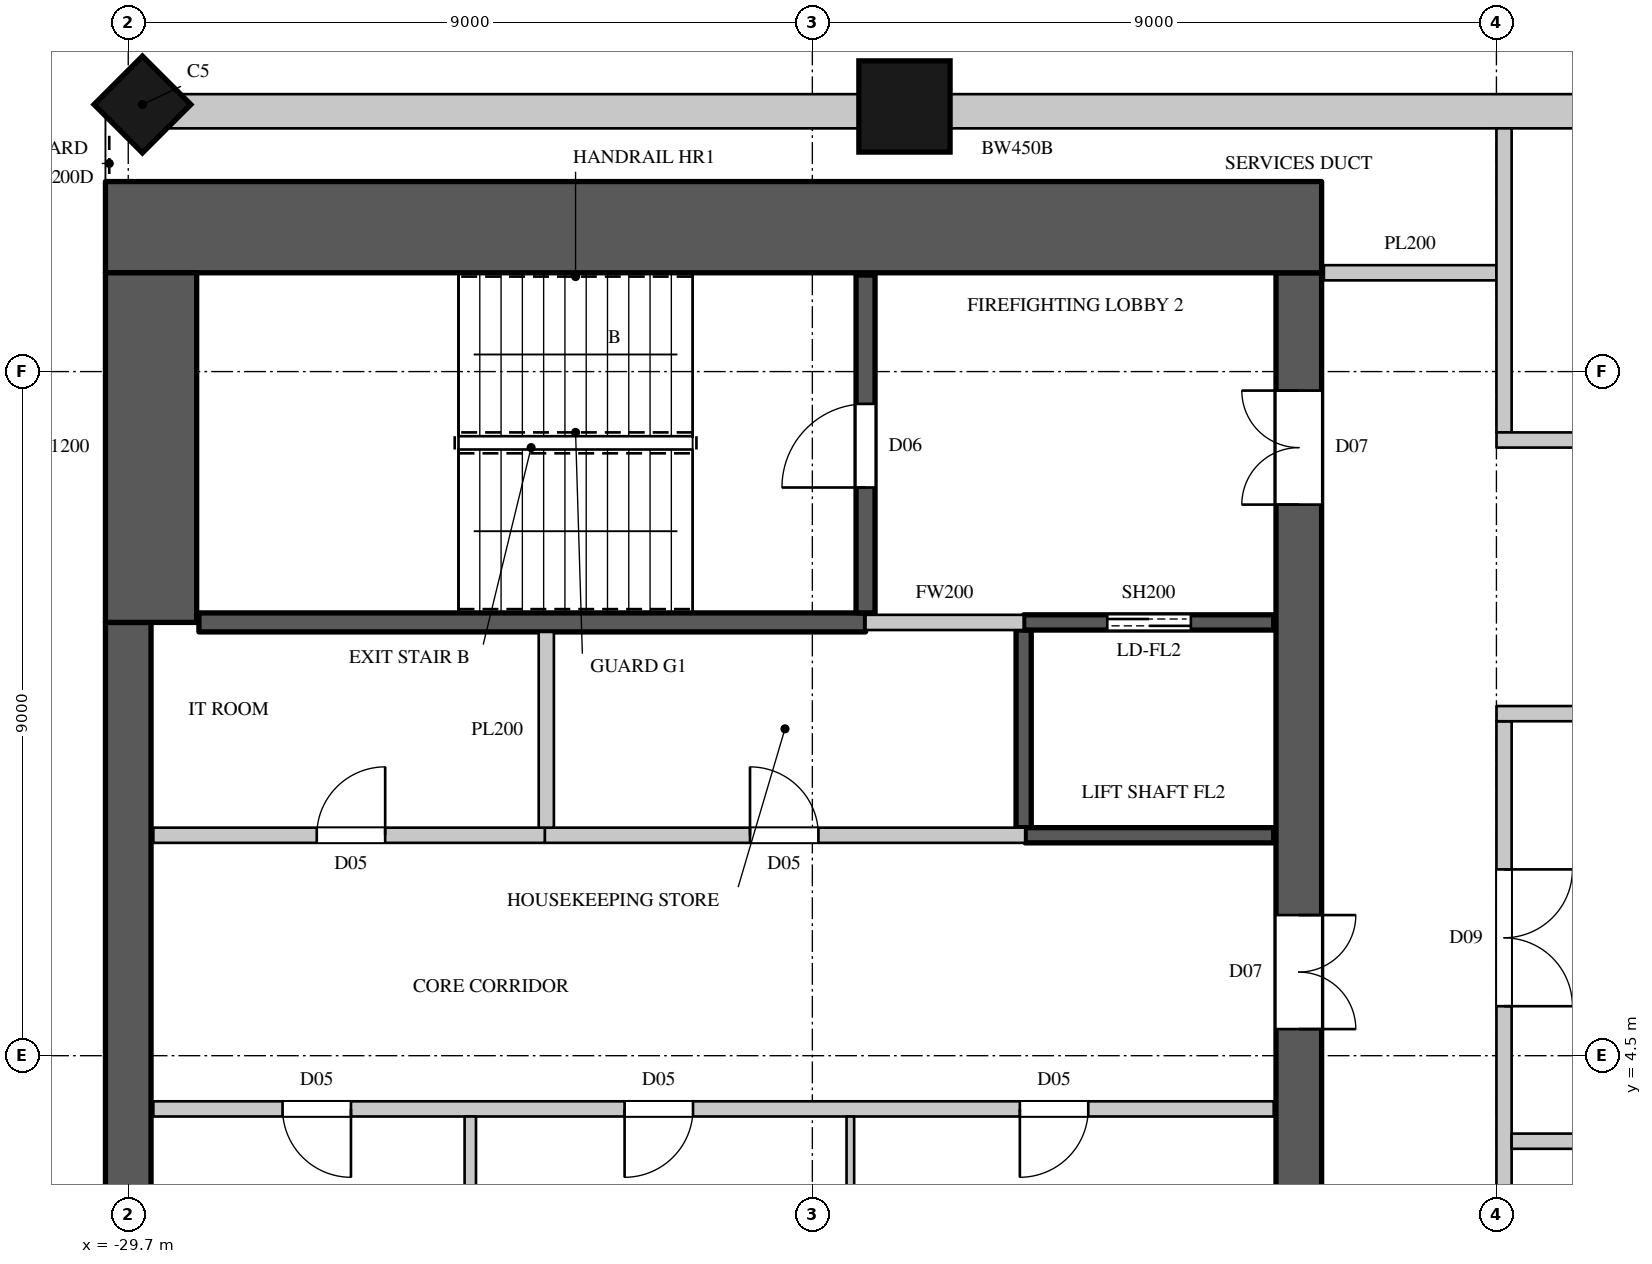
"""IFC4 building model, lengths in metres.
Left out: names, types, materials, properties, quantities, classifications, styles, units other than length and angle.
Written with IfcOpenShell. Run it as: python <this file> out.ifc"""

import sys

from ifc_helpers import new_model, si_unit, direction, frame, frame_2d, origin, origin_2d, place, context, subcontext, project, spatial, rectangle, circle, extrude, element, fill, save


model = new_model("IFC4")
c1 = context("Model", 3, precision=1e-05, world=origin(), true_north=direction((0.0, 1.0)))
c2 = subcontext(c1, "Body", "Model", "MODEL_VIEW")
j1 = project(units=[si_unit("LENGTHUNIT", "METRE"), si_unit("PLANEANGLEUNIT", "RADIAN")], contexts=[c1])
p1 = place(None, origin())
s1 = spatial("IfcSite", under=j1, at=p1, CompositionType="ELEMENT")
p2 = place(p1, origin())
s2 = spatial("IfcBuilding", under=s1, at=p2, CompositionType="ELEMENT")
p3 = place(p2, frame((0.0, 0.0, 335.0)))
s3 = spatial("IfcBuildingStorey", under=s2, at=p3, CompositionType="ELEMENT", Elevation=335.0)
p4 = place(p3, frame((-19.488, 16.988, 0.0), z_axis=(0.0, 0.0, 1.0), x_axis=(1.0, 0.0, 0.0)))
e1 = element("IfcColumn", 1, at=p4, inside=s3, PredefinedType="COLUMN", context=c2, shape_type="SweptSolid", body=[
    extrude(circle(Radius=0.6, at=origin_2d()), origin(), (0.0, 0.0, 1.0), 4.0),
])
p5 = place(p3, frame((-29.514, 17.014, 0.0), z_axis=(0.0, 0.0, 1.0), x_axis=(-0.707106781187, -0.707106781187, 0.0)))
e2 = element("IfcColumn", 2, at=p5, inside=s3, PredefinedType="COLUMN", context=c2, shape_type="SweptSolid", body=[
    extrude(rectangle(XDim=0.9, YDim=0.9, at=origin_2d()), origin(), (0.0, 0.0, 1.0), 4.0),
])
p6 = place(p3, frame((-6.75, 16.925, 0.0), z_axis=(0.0, 0.0, 1.0), x_axis=(-1.0, 0.0, 0.0)))
e3 = element("IfcWall", 3, at=p6, inside=s3, PredefinedType="SOLIDWALL", context=c2, shape_type="SweptSolid", body=[
    extrude(rectangle(XDim=22.5, YDim=0.45, at=frame_2d((11.25, 0.0))), origin(), (0.0, 0.0, 1.0), 3.7),
])
p7 = place(p3, frame((-30.0, 15.4, 0.0), z_axis=(0.0, 0.0, 1.0), x_axis=(1.0, 0.0, 0.0)))
e4 = element("IfcWall", 4, at=p7, inside=s3, PredefinedType="SHEAR", context=c2, shape_type="SweptSolid", body=[
    extrude(rectangle(XDim=16.0, YDim=1.2, at=frame_2d((8.0, 0.0))), origin(), (0.0, 0.0, 1.0), 4.0),
])
p8 = place(p3, frame((-14.3, -14.8, 0.0), z_axis=(0.0, 0.0, 1.0), x_axis=(0.0, 1.0, 0.0)))
e5 = element("IfcWall", 5, at=p8, inside=s3, PredefinedType="SHEAR", context=c2, shape_type="SweptSolid", body=[
    extrude(rectangle(XDim=29.6, YDim=0.6, at=frame_2d((14.8, 0.0))), origin(), (0.0, 0.0, 1.0), 4.0),
])
p9 = place(p8, frame((1.55, 0.0, 0.0)))
e6 = element("IfcOpeningElement", 6, at=p9, cuts=e5, PredefinedType="OPENING", context=c2, shape_type="SweptSolid", body=[
    extrude(rectangle(XDim=1.5, YDim=2.4, at=frame_2d((0.75, 1.2))), frame((0.0, 0.31, 0.0), z_axis=(0.0, -1.0, 0.0), x_axis=(1.0, 0.0, 0.0)), (0.0, 0.0, 1.0), 0.62),
])
p10 = place(p8, frame((26.55, 0.0, 0.0)))
e7 = element("IfcOpeningElement", 7, at=p10, cuts=e5, PredefinedType="OPENING", context=c2, shape_type="SweptSolid", body=[
    extrude(rectangle(XDim=1.5, YDim=2.4, at=frame_2d((0.75, 1.2))), frame((0.0, 0.31, 0.0), z_axis=(0.0, -1.0, 0.0), x_axis=(1.0, 0.0, 0.0)), (0.0, 0.0, 1.0), 0.62),
])
p11 = place(p8, frame((8.45, 0.0, 0.0)))
e8 = element("IfcOpeningElement", 8, at=p11, cuts=e5, PredefinedType="OPENING", context=c2, shape_type="SweptSolid", body=[
    extrude(rectangle(XDim=1.5, YDim=2.4, at=frame_2d((0.75, 1.2))), frame((0.0, 0.31, 0.0), z_axis=(0.0, -1.0, 0.0), x_axis=(1.0, 0.0, 0.0)), (0.0, 0.0, 1.0), 0.62),
])
p12 = place(p8, frame((19.65, 0.0, 0.0)))
e9 = element("IfcOpeningElement", 9, at=p12, cuts=e5, PredefinedType="OPENING", context=c2, shape_type="SweptSolid", body=[
    extrude(rectangle(XDim=1.5, YDim=2.4, at=frame_2d((0.75, 1.2))), frame((0.0, 0.31, 0.0), z_axis=(0.0, -1.0, 0.0), x_axis=(1.0, 0.0, 0.0)), (0.0, 0.0, 1.0), 0.62),
])
p13 = place(p8, frame((14.5, 0.0, 0.0)))
e10 = element("IfcOpeningElement", 10, at=p13, cuts=e5, PredefinedType="OPENING", context=c2, shape_type="SweptSolid", body=[
    extrude(rectangle(XDim=0.6, YDim=2.0, at=frame_2d((0.3, 1.0))), frame((0.0, 0.31, 0.0), z_axis=(0.0, -1.0, 0.0), x_axis=(1.0, 0.0, 0.0)), (0.0, 0.0, 1.0), 0.62),
])
p14 = place(p3, frame((-29.7, -10.2, 0.0), z_axis=(0.0, 0.0, 1.0), x_axis=(0.0, 1.0, 0.0)))
e11 = element("IfcWall", 11, at=p14, inside=s3, PredefinedType="SHEAR", context=c2, shape_type="SweptSolid", body=[
    extrude(rectangle(XDim=20.4, YDim=0.6, at=frame_2d((10.2, 0.0))), origin(), (0.0, 0.0, 1.0), 4.0),
])
p15 = place(p3, frame((-29.4, 10.2, 0.0), z_axis=(0.0, 0.0, 1.0), x_axis=(0.0, 1.0, 0.0)))
e12 = element("IfcWall", 12, at=p15, inside=s3, PredefinedType="SHEAR", context=c2, shape_type="SweptSolid", body=[
    extrude(rectangle(XDim=4.6, YDim=1.2, at=frame_2d((2.3, 0.0))), origin(), (0.0, 0.0, 1.0), 4.0),
])
p16 = place(p3, frame((-29.37, 3.8, 0.0), z_axis=(0.0, 0.0, 1.0), x_axis=(1.0, 0.0, 0.0)))
e13 = element("IfcWall", 13, at=p16, inside=s3, PredefinedType="PARTITIONING", context=c2, shape_type="SweptSolid", body=[
    extrude(rectangle(XDim=14.74, YDim=0.2, at=frame_2d((7.37, 0.0))), origin(), (0.0, 0.0, 1.0), 3.598),
])
p17 = place(p16, frame((1.7, 0.0, 0.0)))
e14 = element("IfcOpeningElement", 14, at=p17, cuts=e13, PredefinedType="OPENING", context=c2, shape_type="SweptSolid", body=[
    extrude(rectangle(XDim=0.9, YDim=2.2, at=frame_2d((0.45, 1.1))), frame((0.0, 0.11, 0.0), z_axis=(0.0, -1.0, 0.0), x_axis=(1.0, 0.0, 0.0)), (0.0, 0.0, 1.0), 0.22),
])
p18 = place(p16, frame((6.2, 0.0, 0.0)))
e15 = element("IfcOpeningElement", 15, at=p18, cuts=e13, PredefinedType="OPENING", context=c2, shape_type="SweptSolid", body=[
    extrude(rectangle(XDim=0.9, YDim=2.2, at=frame_2d((0.45, 1.1))), frame((0.0, 0.11, 0.0), z_axis=(0.0, -1.0, 0.0), x_axis=(1.0, 0.0, 0.0)), (0.0, 0.0, 1.0), 0.22),
])
p19 = place(p16, frame((11.4, 0.0, 0.0)))
e16 = element("IfcOpeningElement", 16, at=p19, cuts=e13, PredefinedType="OPENING", context=c2, shape_type="SweptSolid", body=[
    extrude(rectangle(XDim=0.9, YDim=2.2, at=frame_2d((0.45, 1.1))), frame((0.0, 0.11, 0.0), z_axis=(0.0, -1.0, 0.0), x_axis=(1.0, 0.0, 0.0)), (0.0, 0.0, 1.0), 0.22),
])
p20 = place(p3, frame((-24.22, 7.4, 0.0), z_axis=(0.0, 0.0, 1.0), x_axis=(1.0, 0.0, 0.0)))
e17 = element("IfcWall", 17, at=p20, inside=s3, PredefinedType="PARTITIONING", context=c2, shape_type="SweptSolid", body=[
    extrude(rectangle(XDim=6.32, YDim=0.2, at=frame_2d((3.16, 0.0))), origin(), (0.0, 0.0, 1.0), 3.598),
])
p21 = place(p20, frame((2.7, 0.0, 0.0)))
e18 = element("IfcOpeningElement", 18, at=p21, cuts=e17, PredefinedType="OPENING", context=c2, shape_type="SweptSolid", body=[
    extrude(rectangle(XDim=0.9, YDim=2.2, at=frame_2d((0.45, 1.1))), frame((0.0, 0.11, 0.0), z_axis=(0.0, -1.0, 0.0), x_axis=(1.0, 0.0, 0.0)), (0.0, 0.0, 1.0), 0.22),
])
p22 = place(p3, frame((-20.0, 10.2, 0.0), z_axis=(0.0, 0.0, 1.0), x_axis=(1.0, 0.0, 0.0)))
e19 = element("IfcWall", 19, at=p22, inside=s3, PredefinedType="PARTITIONING", context=c2, shape_type="SweptSolid", body=[
    extrude(rectangle(XDim=2.08, YDim=0.2, at=frame_2d((1.04, 0.0))), origin(), (0.0, 0.0, 1.0), 3.598),
])
p23 = place(p3, frame((-25.2, 1.1, 0.0), z_axis=(0.0, 0.0, 1.0), x_axis=(0.0, 1.0, 0.0)))
e20 = element("IfcWall", 20, at=p23, inside=s3, PredefinedType="PARTITIONING", context=c2, shape_type="SweptSolid", body=[
    extrude(rectangle(XDim=2.6, YDim=0.15, at=frame_2d((1.3, 0.0))), origin(), (0.0, 0.0, 1.0), 3.598),
])
p24 = place(p3, frame((-29.37, 7.4, 0.0), z_axis=(0.0, 0.0, 1.0), x_axis=(1.0, 0.0, 0.0)))
e21 = element("IfcWall", 21, at=p24, inside=s3, PredefinedType="PARTITIONING", context=c2, shape_type="SweptSolid", body=[
    extrude(rectangle(XDim=5.15, YDim=0.2, at=frame_2d((2.575, 0.0))), origin(), (0.0, 0.0, 1.0), 3.598),
])
p25 = place(p24, frame((2.15, 0.0, 0.0)))
e22 = element("IfcOpeningElement", 22, at=p25, cuts=e21, PredefinedType="OPENING", context=c2, shape_type="SweptSolid", body=[
    extrude(rectangle(XDim=0.9, YDim=2.2, at=frame_2d((0.45, 1.1))), frame((0.0, 0.11, 0.0), z_axis=(0.0, -1.0, 0.0), x_axis=(1.0, 0.0, 0.0)), (0.0, 0.0, 1.0), 0.22),
])
p26 = place(p3, frame((-24.2, 7.5, 0.0), z_axis=(0.0, 0.0, 1.0), x_axis=(0.0, 1.0, 0.0)))
e23 = element("IfcWall", 23, at=p26, inside=s3, PredefinedType="PARTITIONING", context=c2, shape_type="SweptSolid", body=[
    extrude(rectangle(XDim=2.575, YDim=0.2, at=frame_2d((1.288, 0.0))), origin(), (0.0, 0.0, 1.0), 3.598),
])
p27 = place(p3, frame((-13.97, 14.8, 0.0), z_axis=(0.0, 0.0, 1.0), x_axis=(1.0, 0.0, 0.0)))
e24 = element("IfcWall", 24, at=p27, inside=s3, PredefinedType="PARTITIONING", context=c2, shape_type="SweptSolid", body=[
    extrude(rectangle(XDim=2.27, YDim=0.2, at=frame_2d((1.135, 0.0))), origin(), (0.0, 0.0, 1.0), 3.598),
])
p28 = place(p3, frame((-11.6, -8.899, 0.0), z_axis=(0.0, 0.0, 1.0), x_axis=(0.0, 1.0, 0.0)))
e25 = element("IfcWall", 25, at=p28, inside=s3, PredefinedType="PARTITIONING", context=c2, shape_type="SweptSolid", body=[
    extrude(rectangle(XDim=17.798, YDim=0.2, at=frame_2d((8.899, 0.0))), origin(), (0.0, 0.0, 1.0), 3.598),
])
p29 = place(p28, frame((1.95, 0.0, 0.0)))
e26 = element("IfcOpeningElement", 26, at=p29, cuts=e25, PredefinedType="OPENING", context=c2, shape_type="SweptSolid", body=[
    extrude(rectangle(XDim=1.8, YDim=2.4, at=frame_2d((0.9, 1.2))), frame((0.0, 0.11, 0.0), z_axis=(0.0, -1.0, 0.0), x_axis=(1.0, 0.0, 0.0)), (0.0, 0.0, 1.0), 0.22),
])
p30 = place(p28, frame((8.0, 0.0, 0.0)))
e27 = element("IfcOpeningElement", 27, at=p30, cuts=e25, PredefinedType="OPENING", context=c2, shape_type="SweptSolid", body=[
    extrude(rectangle(XDim=1.8, YDim=2.4, at=frame_2d((0.9, 1.2))), frame((0.0, 0.11, 0.0), z_axis=(0.0, -1.0, 0.0), x_axis=(1.0, 0.0, 0.0)), (0.0, 0.0, 1.0), 0.22),
])
p31 = place(p28, frame((14.05, 0.0, 0.0)))
e28 = element("IfcOpeningElement", 28, at=p31, cuts=e25, PredefinedType="OPENING", context=c2, shape_type="SweptSolid", body=[
    extrude(rectangle(XDim=1.8, YDim=2.4, at=frame_2d((0.9, 1.2))), frame((0.0, 0.11, 0.0), z_axis=(0.0, -1.0, 0.0), x_axis=(1.0, 0.0, 0.0)), (0.0, 0.0, 1.0), 0.22),
])
p32 = place(p3, frame((-11.5, 3.375, 0.0), z_axis=(0.0, 0.0, 1.0), x_axis=(1.0, 0.0, 0.0)))
e29 = element("IfcWall", 29, at=p32, inside=s3, PredefinedType="PARTITIONING", context=c2, shape_type="SweptSolid", body=[
    extrude(rectangle(XDim=5.6, YDim=0.2, at=frame_2d((2.8, 0.0))), origin(), (0.0, 0.0, 1.0), 3.598),
])
p33 = place(p3, frame((-11.6, 12.701, 0.0), z_axis=(0.0, 0.0, 1.0), x_axis=(0.0, 1.0, 0.0)))
e30 = element("IfcWall", 30, at=p33, inside=s3, PredefinedType="PARTITIONING", context=c2, shape_type="SweptSolid", body=[
    extrude(rectangle(XDim=3.999, YDim=0.2, at=frame_2d((2.0, 0.0))), origin(), (0.0, 0.0, 1.0), 3.598),
])
p34 = place(p3, frame((-11.699, 9.0, 0.0), z_axis=(0.0, 0.0, 1.0), x_axis=(1.0, 0.0, 0.0)))
e31 = element("IfcWall", 31, at=p34, inside=s3, PredefinedType="PARTITIONING", context=c2, shape_type="SweptSolid", body=[
    extrude(rectangle(XDim=5.719, YDim=0.2, at=frame_2d((2.859, 0.0))), origin(), (0.0, 0.0, 1.0), 3.598),
])
p35 = place(p3, frame((-11.699, 12.6, 0.0), z_axis=(0.0, 0.0, 1.0), x_axis=(1.0, 0.0, 0.0)))
e32 = element("IfcWall", 32, at=p35, inside=s3, PredefinedType="PARTITIONING", context=c2, shape_type="SweptSolid", body=[
    extrude(rectangle(XDim=4.899, YDim=0.2, at=frame_2d((2.449, 0.0))), origin(), (0.0, 0.0, 1.0), 3.598),
])
p36 = place(p35, frame((1.5, 0.0, 0.0)))
e33 = element("IfcOpeningElement", 33, at=p36, cuts=e32, PredefinedType="OPENING", context=c2, shape_type="SweptSolid", body=[
    extrude(rectangle(XDim=1.8, YDim=2.4, at=frame_2d((0.9, 1.2))), frame((0.0, 0.11, 0.0), z_axis=(0.0, -1.0, 0.0), x_axis=(1.0, 0.0, 0.0)), (0.0, 0.0, 1.0), 0.22),
])
p37 = place(p3, frame((-17.92, 7.5, 0.0), z_axis=(0.0, 0.0, 1.0), x_axis=(0.0, 1.0, 0.0)))
e34 = element("IfcWall", 34, at=p37, inside=s3, PredefinedType="SHEAR", context=c2, shape_type="SweptSolid", body=[
    extrude(rectangle(XDim=2.6, YDim=0.2, at=frame_2d((1.3, 0.0))), origin(), (0.0, 0.0, 1.0), 3.598),
])
p38 = place(p3, frame((-17.9, 7.4, 0.0), z_axis=(0.0, 0.0, 1.0), x_axis=(1.0, 0.0, 0.0)))
e35 = element("IfcWall", 35, at=p38, inside=s3, PredefinedType="SHEAR", context=c2, shape_type="SweptSolid", body=[
    extrude(rectangle(XDim=3.27, YDim=0.2, at=frame_2d((1.635, 0.0))), origin(), (0.0, 0.0, 1.0), 3.598),
])
p39 = place(p3, frame((-17.92, 10.2, 0.0), z_axis=(0.0, 0.0, 1.0), x_axis=(1.0, 0.0, 0.0)))
e36 = element("IfcWall", 36, at=p39, inside=s3, PredefinedType="SHEAR", context=c2, shape_type="SweptSolid", body=[
    extrude(rectangle(XDim=3.29, YDim=0.2, at=frame_2d((1.645, 0.0))), origin(), (0.0, 0.0, 1.0), 3.598),
])
p40 = place(p39, frame((1.1, 0.0, 0.0)))
e37 = element("IfcOpeningElement", 37, at=p40, cuts=e36, PredefinedType="OPENING", context=c2, shape_type="SweptSolid", body=[
    extrude(rectangle(XDim=1.1, YDim=2.2, at=frame_2d((0.55, 1.1))), frame((0.0, 0.11, 0.0), z_axis=(0.0, -1.0, 0.0), x_axis=(1.0, 0.0, 0.0)), (0.0, 0.0, 1.0), 0.22),
])
p41 = place(p3, frame((-28.77, 10.2, 0.0), z_axis=(0.0, 0.0, 1.0), x_axis=(1.0, 0.0, 0.0)))
e38 = element("IfcWall", 38, at=p41, inside=s3, PredefinedType="SHEAR", context=c2, shape_type="SweptSolid", body=[
    extrude(rectangle(XDim=8.77, YDim=0.25, at=frame_2d((4.385, 0.0))), origin(), (0.0, 0.0, 1.0), 3.598),
])
p42 = place(p3, frame((-20.0, 10.325, 0.0), z_axis=(0.0, 0.0, 1.0), x_axis=(0.0, 1.0, 0.0)))
e39 = element("IfcWall", 39, at=p42, inside=s3, PredefinedType="SHEAR", context=c2, shape_type="SweptSolid", body=[
    extrude(rectangle(XDim=4.445, YDim=0.25, at=frame_2d((2.223, 0.0))), origin(), (0.0, 0.0, 1.0), 3.598),
])
p43 = place(p42, frame((1.65, 0.0, 0.0)))
e40 = element("IfcOpeningElement", 40, at=p43, cuts=e39, PredefinedType="OPENING", context=c2, shape_type="SweptSolid", body=[
    extrude(rectangle(XDim=1.1, YDim=2.2, at=frame_2d((0.55, 1.1))), frame((0.0, 0.135, 0.0), z_axis=(0.0, -1.0, 0.0), x_axis=(1.0, 0.0, 0.0)), (0.0, 0.0, 1.0), 0.27),
])
p44 = place(p3, frame((-20.2, 1.1, 0.0), z_axis=(0.0, 0.0, 1.0), x_axis=(0.0, 1.0, 0.0)))
e41 = element("IfcWall", 41, at=p44, inside=s3, PredefinedType="PARTITIONING", context=c2, shape_type="SweptSolid", body=[
    extrude(rectangle(XDim=2.6, YDim=0.1, at=frame_2d((1.3, 0.0))), origin(), (0.0, 0.0, 1.0), 3.598),
])
p45 = place(p43, origin())
e42 = element("IfcDoor", 42, at=p45, inside=s3, OperationType="SINGLE_SWING_LEFT", PredefinedType="DOOR", context=c2, shape_type="SweptSolid", body=[
    extrude(rectangle(XDim=1.1, YDim=2.2, at=frame_2d((0.55, 1.1))), frame((0.0, 0.025, 0.0), z_axis=(0.0, -1.0, 0.0), x_axis=(1.0, 0.0, 0.0)), (0.0, 0.0, 1.0), 0.05),
])
fill(e40, e42)
p46 = place(p17, origin())
e43 = element("IfcDoor", 43, at=p46, inside=s3, OperationType="SINGLE_SWING_LEFT", PredefinedType="DOOR", context=c2, shape_type="SweptSolid", body=[
    extrude(rectangle(XDim=0.9, YDim=2.2, at=frame_2d((0.45, 1.1))), frame((0.0, 0.025, 0.0), z_axis=(0.0, -1.0, 0.0), x_axis=(1.0, 0.0, 0.0)), (0.0, 0.0, 1.0), 0.05),
])
fill(e14, e43)
p47 = place(p18, origin())
e44 = element("IfcDoor", 44, at=p47, inside=s3, OperationType="SINGLE_SWING_RIGHT", PredefinedType="DOOR", context=c2, shape_type="SweptSolid", body=[
    extrude(rectangle(XDim=0.9, YDim=2.2, at=frame_2d((0.45, 1.1))), frame((0.0, 0.025, 0.0), z_axis=(0.0, -1.0, 0.0), x_axis=(1.0, 0.0, 0.0)), (0.0, 0.0, 1.0), 0.05),
])
fill(e15, e44)
p48 = place(p19, origin())
e45 = element("IfcDoor", 45, at=p48, inside=s3, OperationType="SINGLE_SWING_RIGHT", PredefinedType="DOOR", context=c2, shape_type="SweptSolid", body=[
    extrude(rectangle(XDim=0.9, YDim=2.2, at=frame_2d((0.45, 1.1))), frame((0.0, 0.025, 0.0), z_axis=(0.0, -1.0, 0.0), x_axis=(1.0, 0.0, 0.0)), (0.0, 0.0, 1.0), 0.05),
])
fill(e16, e45)
p49 = place(p25, origin())
e46 = element("IfcDoor", 46, at=p49, inside=s3, OperationType="SINGLE_SWING_RIGHT", PredefinedType="DOOR", context=c2, shape_type="SweptSolid", body=[
    extrude(rectangle(XDim=0.9, YDim=2.2, at=frame_2d((0.45, 1.1))), frame((0.0, 0.025, 0.0), z_axis=(0.0, -1.0, 0.0), x_axis=(1.0, 0.0, 0.0)), (0.0, 0.0, 1.0), 0.05),
])
fill(e22, e46)
p50 = place(p21, origin())
e47 = element("IfcDoor", 47, at=p50, inside=s3, OperationType="SINGLE_SWING_LEFT", PredefinedType="DOOR", context=c2, shape_type="SweptSolid", body=[
    extrude(rectangle(XDim=0.9, YDim=2.2, at=frame_2d((0.45, 1.1))), frame((0.0, 0.025, 0.0), z_axis=(0.0, -1.0, 0.0), x_axis=(1.0, 0.0, 0.0)), (0.0, 0.0, 1.0), 0.05),
])
fill(e18, e47)
p51 = place(p40, origin())
e48 = element("IfcDoor", 48, at=p51, inside=s3, OperationType="DOUBLE_DOOR_SLIDING", PredefinedType="DOOR", context=c2, shape_type="SweptSolid", body=[
    extrude(rectangle(XDim=1.1, YDim=2.2, at=frame_2d((0.55, 1.1))), frame((0.0, 0.025, 0.0), z_axis=(0.0, -1.0, 0.0), x_axis=(1.0, 0.0, 0.0)), (0.0, 0.0, 1.0), 0.05),
])
fill(e37, e48)
p52 = place(p31, origin())
e49 = element("IfcDoor", 49, at=p52, inside=s3, OperationType="DOUBLE_DOOR_SINGLE_SWING", PredefinedType="DOOR", context=c2, shape_type="SweptSolid", body=[
    extrude(rectangle(XDim=1.8, YDim=2.4, at=frame_2d((0.9, 1.2))), frame((0.0, 0.025, 0.0), z_axis=(0.0, -1.0, 0.0), x_axis=(1.0, 0.0, 0.0)), (0.0, 0.0, 1.0), 0.05),
])
fill(e28, e49)
p53 = place(p10, origin())
e50 = element("IfcDoor", 50, at=p53, inside=s3, OperationType="DOUBLE_DOOR_SINGLE_SWING", PredefinedType="DOOR", context=c2, shape_type="SweptSolid", body=[
    extrude(rectangle(XDim=1.5, YDim=2.4, at=frame_2d((0.75, 1.2))), frame((0.0, 0.295, 0.0), z_axis=(0.0, -1.0, 0.0), x_axis=(1.0, 0.0, 0.0)), (0.0, 0.0, 1.0), 0.05),
])
fill(e7, e50)
p54 = place(p12, origin())
e51 = element("IfcDoor", 51, at=p54, inside=s3, OperationType="DOUBLE_DOOR_SINGLE_SWING", PredefinedType="DOOR", context=c2, shape_type="SweptSolid", body=[
    extrude(rectangle(XDim=1.5, YDim=2.4, at=frame_2d((0.75, 1.2))), frame((0.0, -0.245, 0.0), z_axis=(0.0, -1.0, 0.0), x_axis=(1.0, 0.0, 0.0)), (0.0, 0.0, 1.0), 0.05),
])
fill(e9, e51)
save(model, sys.argv[1])
